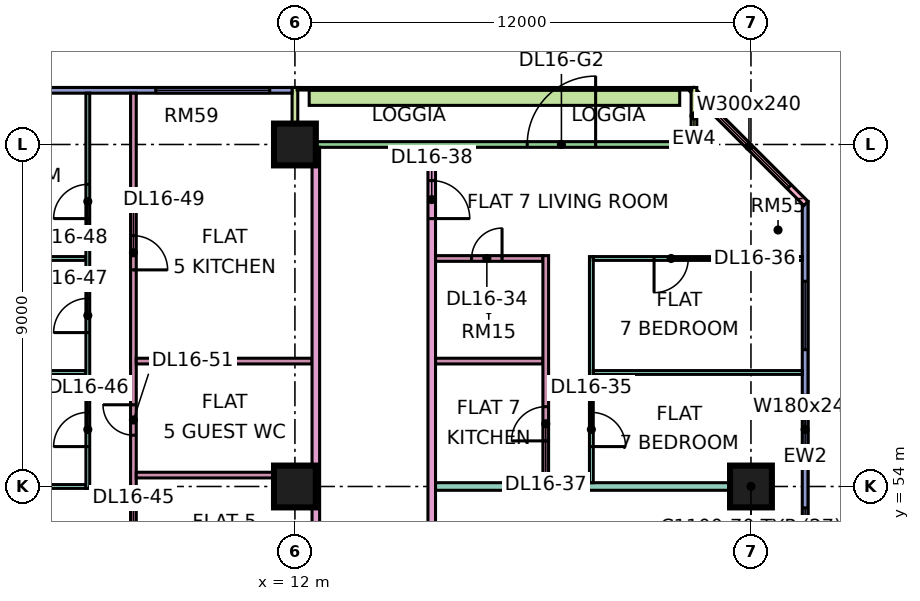
"""IFC4 building model, lengths in metres.
Left out: names, types, materials, properties, quantities, classifications, styles, units other than length and angle.
Written with IfcOpenShell. Run it as: python <this file> out.ifc"""

import sys

from ifc_helpers import new_model, si_unit, direction, frame, frame_2d, origin, origin_2d, place, context, subcontext, project, spatial, rectangle, extrude, element, fill, save


model = new_model("IFC4")
c1 = context("Model", 3, precision=1e-05, world=origin(), true_north=direction((0.0, 1.0)))
c2 = subcontext(c1, "Body", "Model", "MODEL_VIEW")
j1 = project(units=[si_unit("LENGTHUNIT", "METRE"), si_unit("PLANEANGLEUNIT", "RADIAN")], contexts=[c1])
p1 = place(None, origin())
s1 = spatial("IfcSite", under=j1, at=p1, CompositionType="ELEMENT")
p2 = place(p1, origin())
s2 = spatial("IfcBuilding", under=s1, at=p2, CompositionType="ELEMENT")
p3 = place(p2, frame((0.0, 0.0, 75.15)))
s3 = spatial("IfcBuildingStorey", under=s2, at=p3, CompositionType="ELEMENT", Elevation=75.15)
for number, where, z_axis, x_axis in (
    (1, (12.0, 54.0, 0.0), (0.0, 0.0, 1.0), (1.0, 0.0, 0.0)),
    (2, (12.0, 63.0, 0.0), (0.0, 0.0, 1.0), (1.0, 0.0, 0.0)),
    (3, (24.0, 54.0, 0.0), (0.0, 0.0, 1.0), (1.0, 0.0, 0.0)),
):
    element("IfcColumn", number, at=place(p3, frame(where, z_axis=z_axis, x_axis=x_axis)), inside=s3, PredefinedType="COLUMN", context=c2, shape_type="SweptSolid", body=[
        extrude(rectangle(XDim=1.1, YDim=1.1, at=origin_2d()), origin(), (0.0, 0.0, 1.0), 3.75),
    ])
p4 = place(p3, frame((25.425, 48.075, 0.0), z_axis=(0.0, 0.0, 1.0), x_axis=(0.0, 1.0, 0.0)))
e4 = element("IfcWall", 4, at=p4, inside=s3, PredefinedType="SOLIDWALL", context=c2, shape_type="SweptSolid", body=[
    extrude(rectangle(XDim=13.425, YDim=0.15, at=frame_2d((6.712, 0.0))), origin(), (0.0, 0.0, 1.0), 3.35),
])
p5 = place(p4, frame((0.562, 0.0, 0.45)))
e5 = element("IfcOpeningElement", 5, at=p5, cuts=e4, PredefinedType="OPENING", context=c2, shape_type="SweptSolid", body=[
    extrude(rectangle(XDim=4.8, YDim=2.4, at=frame_2d((2.4, 1.2))), frame((0.0, 0.085, 0.0), z_axis=(0.0, -1.0, 0.0), x_axis=(1.0, 0.0, 0.0)), (0.0, 0.0, 1.0), 0.17),
])
p6 = place(p4, frame((6.525, 0.0, 0.45)))
e6 = element("IfcOpeningElement", 6, at=p6, cuts=e4, PredefinedType="OPENING", context=c2, shape_type="SweptSolid", body=[
    extrude(rectangle(XDim=1.8, YDim=2.4, at=frame_2d((0.9, 1.2))), frame((0.0, 0.085, 0.0), z_axis=(0.0, -1.0, 0.0), x_axis=(1.0, 0.0, 0.0)), (0.0, 0.0, 1.0), 0.17),
])
p7 = place(p4, frame((9.525, 0.0, 0.45)))
e7 = element("IfcOpeningElement", 7, at=p7, cuts=e4, PredefinedType="OPENING", context=c2, shape_type="SweptSolid", body=[
    extrude(rectangle(XDim=1.8, YDim=2.4, at=frame_2d((0.9, 1.2))), frame((0.0, 0.085, 0.0), z_axis=(0.0, -1.0, 0.0), x_axis=(1.0, 0.0, 0.0)), (0.0, 0.0, 1.0), 0.17),
])
p8 = place(p3, frame((25.447, 61.447, 0.0), z_axis=(0.0, 0.0, 1.0), x_axis=(-0.707106781187, 0.707106781187, 0.0)))
e8 = element("IfcWall", 8, at=p8, inside=s3, PredefinedType="SOLIDWALL", context=c2, shape_type="SweptSolid", body=[
    extrude(rectangle(XDim=4.243, YDim=0.15, at=frame_2d((2.121, 0.0))), origin(), (0.0, 0.0, 1.0), 3.35),
])
p9 = place(p8, frame((0.621, 0.0, 0.45)))
e9 = element("IfcOpeningElement", 9, at=p9, cuts=e8, PredefinedType="OPENING", context=c2, shape_type="SweptSolid", body=[
    extrude(rectangle(XDim=3.0, YDim=2.4, at=frame_2d((1.5, 1.2))), frame((0.0, 0.085, 0.0), z_axis=(0.0, -1.0, 0.0), x_axis=(1.0, 0.0, 0.0)), (0.0, 0.0, 1.0), 0.17),
])
p10 = place(p3, frame((22.425, 63.0, 0.0), z_axis=(0.0, 0.0, 1.0), x_axis=(-1.0, 0.0, 0.0)))
e10 = element("IfcWall", 10, at=p10, inside=s3, PredefinedType="SOLIDWALL", context=c2, shape_type="SweptSolid", body=[
    extrude(rectangle(XDim=10.35, YDim=0.15, at=frame_2d((5.175, 0.0))), origin(), (0.0, 0.0, 1.0), 3.35),
])
p11 = place(p10, frame((2.512, 0.0, 0.0)))
e11 = element("IfcOpeningElement", 11, at=p11, cuts=e10, PredefinedType="OPENING", context=c2, shape_type="SweptSolid", body=[
    extrude(rectangle(XDim=1.8, YDim=2.4, at=frame_2d((0.9, 1.2))), frame((0.0, 0.085, 0.0), z_axis=(0.0, -1.0, 0.0), x_axis=(1.0, 0.0, 0.0)), (0.0, 0.0, 1.0), 0.17),
])
for number, where, z_axis, x_axis in (
    (12, (22.5, 64.5, 0.0), (0.0, 0.0, 1.0), (0.0, -1.0, 0.0)),
    (13, (12.0, 64.5, 0.0), (0.0, 0.0, 1.0), (0.0, -1.0, 0.0)),
):
    element("IfcWall", number, at=place(p3, frame(where, z_axis=z_axis, x_axis=x_axis)), inside=s3, PredefinedType="SOLIDWALL", context=c2, shape_type="SweptSolid", body=[
        extrude(rectangle(XDim=1.5, YDim=0.15, at=frame_2d((0.75, 0.0))), origin(), (0.0, 0.0, 1.0), 3.35),
    ])
p12 = place(p3, frame((11.925, 64.425, 0.0), z_axis=(0.0, 0.0, 1.0), x_axis=(-1.0, 0.0, 0.0)))
e14 = element("IfcWall", 14, at=p12, inside=s3, PredefinedType="SOLIDWALL", context=c2, shape_type="SweptSolid", body=[
    extrude(rectangle(XDim=10.425, YDim=0.15, at=frame_2d((5.212, 0.0))), origin(), (0.0, 0.0, 1.0), 3.35),
])
p13 = place(p12, frame((0.587, 0.0, 0.45)))
e15 = element("IfcOpeningElement", 15, at=p13, cuts=e14, PredefinedType="OPENING", context=c2, shape_type="SweptSolid", body=[
    extrude(rectangle(XDim=3.0, YDim=2.4, at=frame_2d((1.5, 1.2))), frame((0.0, 0.085, 0.0), z_axis=(0.0, -1.0, 0.0), x_axis=(1.0, 0.0, 0.0)), (0.0, 0.0, 1.0), 0.17),
])
p14 = place(p12, frame((6.4, 0.0, 0.45)))
e16 = element("IfcOpeningElement", 16, at=p14, cuts=e14, PredefinedType="OPENING", context=c2, shape_type="SweptSolid", body=[
    extrude(rectangle(XDim=3.0, YDim=2.4, at=frame_2d((1.5, 1.2))), frame((0.0, 0.085, 0.0), z_axis=(0.0, -1.0, 0.0), x_axis=(1.0, 0.0, 0.0)), (0.0, 0.0, 1.0), 0.17),
])
p15 = place(p3, frame((22.125, 64.229, 0.0), z_axis=(0.0, 0.0, 1.0), x_axis=(-1.0, 0.0, 0.0)))
e17 = element("IfcWall", 17, at=p15, inside=s3, PredefinedType="SOLIDWALL", context=c2, shape_type="SweptSolid", body=[
    extrude(rectangle(XDim=9.75, YDim=0.4, at=frame_2d((4.875, 0.0))), origin(), (0.0, 0.0, 1.0), 0.7),
])
for number, where, z_axis, x_axis in (
    (18, (-1.351, 57.0, 0.0), (0.0, 0.0, 1.0), (1.0, 0.0, 0.0)),
    (19, (-1.351, 60.0, 0.0), (0.0, 0.0, 1.0), (1.0, 0.0, 0.0)),
):
    element("IfcWall", number, at=place(p3, frame(where, z_axis=z_axis, x_axis=x_axis)), inside=s3, PredefinedType="PARTITIONING", context=c2, shape_type="SweptSolid", body=[
        extrude(rectangle(XDim=7.851, YDim=0.1, at=frame_2d((3.926, 0.0))), origin(), (0.0, 0.0, 1.0), 3.35),
    ])
p16 = place(p3, frame((0.0, 54.0, 0.0), z_axis=(0.0, 0.0, 1.0), x_axis=(1.0, 0.0, 0.0)))
e20 = element("IfcWall", 20, at=p16, inside=s3, PredefinedType="PARTITIONING", context=c2, shape_type="SweptSolid", body=[
    extrude(rectangle(XDim=6.5, YDim=0.1, at=frame_2d((3.25, 0.0))), origin(), (0.0, 0.0, 1.0), 3.35),
])
p17 = place(p3, frame((6.55, 53.95, 0.0), z_axis=(0.0, 0.0, 1.0), x_axis=(0.0, 1.0, 0.0)))
e21 = element("IfcWall", 21, at=p17, inside=s3, PredefinedType="PARTITIONING", context=c2, shape_type="SweptSolid", body=[
    extrude(rectangle(XDim=10.4, YDim=0.1, at=frame_2d((5.2, 0.0))), origin(), (0.0, 0.0, 1.0), 3.35),
])
p18 = place(p17, frame((1.1, 0.0, 0.0)))
e22 = element("IfcOpeningElement", 22, at=p18, cuts=e21, PredefinedType="OPENING", context=c2, shape_type="SweptSolid", body=[
    extrude(rectangle(XDim=0.9, YDim=2.1, at=frame_2d((0.45, 1.05))), frame((0.0, 0.06, 0.0), z_axis=(0.0, -1.0, 0.0), x_axis=(1.0, 0.0, 0.0)), (0.0, 0.0, 1.0), 0.12),
])
p19 = place(p17, frame((4.1, 0.0, 0.0)))
e23 = element("IfcOpeningElement", 23, at=p19, cuts=e21, PredefinedType="OPENING", context=c2, shape_type="SweptSolid", body=[
    extrude(rectangle(XDim=0.9, YDim=2.1, at=frame_2d((0.45, 1.05))), frame((0.0, 0.06, 0.0), z_axis=(0.0, -1.0, 0.0), x_axis=(1.0, 0.0, 0.0)), (0.0, 0.0, 1.0), 0.12),
])
p20 = place(p17, frame((7.1, 0.0, 0.0)))
e24 = element("IfcOpeningElement", 24, at=p20, cuts=e21, PredefinedType="OPENING", context=c2, shape_type="SweptSolid", body=[
    extrude(rectangle(XDim=0.9, YDim=2.1, at=frame_2d((0.45, 1.05))), frame((0.0, 0.06, 0.0), z_axis=(0.0, -1.0, 0.0), x_axis=(1.0, 0.0, 0.0)), (0.0, 0.0, 1.0), 0.12),
])
p21 = place(p3, frame((7.75, 50.925, 0.0), z_axis=(0.0, 0.0, 1.0), x_axis=(0.0, 1.0, 0.0)))
e25 = element("IfcWall", 25, at=p21, inside=s3, PredefinedType="PARTITIONING", context=c2, shape_type="SweptSolid", body=[
    extrude(rectangle(XDim=13.425, YDim=0.15, at=frame_2d((6.712, 0.0))), origin(), (0.0, 0.0, 1.0), 3.35),
])
p22 = place(p21, frame((1.275, 0.0, 0.0)))
e26 = element("IfcOpeningElement", 26, at=p22, cuts=e25, PredefinedType="OPENING", context=c2, shape_type="SweptSolid", body=[
    extrude(rectangle(XDim=0.8, YDim=2.1, at=frame_2d((0.4, 1.05))), frame((0.0, 0.085, 0.0), z_axis=(0.0, -1.0, 0.0), x_axis=(1.0, 0.0, 0.0)), (0.0, 0.0, 1.0), 0.17),
])
p23 = place(p21, frame((8.775, 0.0, 0.0)))
e27 = element("IfcOpeningElement", 27, at=p23, cuts=e25, PredefinedType="OPENING", context=c2, shape_type="SweptSolid", body=[
    extrude(rectangle(XDim=0.9, YDim=2.1, at=frame_2d((0.45, 1.05))), frame((0.0, 0.085, 0.0), z_axis=(0.0, -1.0, 0.0), x_axis=(1.0, 0.0, 0.0)), (0.0, 0.0, 1.0), 0.17),
])
p24 = place(p21, frame((4.425, 0.0, 0.0)))
e28 = element("IfcOpeningElement", 28, at=p24, cuts=e25, PredefinedType="OPENING", context=c2, shape_type="SweptSolid", body=[
    extrude(rectangle(XDim=0.8, YDim=2.1, at=frame_2d((0.4, 1.05))), frame((0.0, 0.085, 0.0), z_axis=(0.0, -1.0, 0.0), x_axis=(1.0, 0.0, 0.0)), (0.0, 0.0, 1.0), 0.17),
])
for number, where, z_axis, x_axis in (
    (29, (7.825, 54.3, 0.0), (0.0, 0.0, 1.0), (1.0, 0.0, 0.0)),
    (30, (7.825, 57.3, 0.0), (0.0, 0.0, 1.0), (1.0, 0.0, 0.0)),
):
    element("IfcWall", number, at=place(p3, frame(where, z_axis=z_axis, x_axis=x_axis)), inside=s3, PredefinedType="PARTITIONING", context=c2, shape_type="SweptSolid", body=[
        extrude(rectangle(XDim=4.625, YDim=0.15, at=frame_2d((2.312, 0.0))), origin(), (0.0, 0.0, 1.0), 3.35),
    ])
p25 = place(p3, frame((12.55, 20.0, 0.0), z_axis=(0.0, 0.0, 1.0), x_axis=(0.0, 1.0, 0.0)))
e31 = element("IfcWall", 31, at=p25, inside=s3, PredefinedType="PARTITIONING", context=c2, shape_type="SweptSolid", body=[
    extrude(rectangle(XDim=42.926, YDim=0.2, at=frame_2d((21.463, 0.0))), origin(), (0.0, 0.0, 1.0), 3.35),
])
p26 = place(p25, frame((17.1, 0.0, 0.0)))
e32 = element("IfcOpeningElement", 32, at=p26, cuts=e31, PredefinedType="OPENING", context=c2, shape_type="SweptSolid", body=[
    extrude(rectangle(XDim=1.0, YDim=2.1, at=frame_2d((0.5, 1.05))), frame((0.0, 0.11, 0.0), z_axis=(0.0, -1.0, 0.0), x_axis=(1.0, 0.0, 0.0)), (0.0, 0.0, 1.0), 0.22),
])
p27 = place(p25, frame((28.95, 0.0, 0.0)))
e33 = element("IfcOpeningElement", 33, at=p27, cuts=e31, PredefinedType="OPENING", context=c2, shape_type="SweptSolid", body=[
    extrude(rectangle(XDim=1.0, YDim=2.1, at=frame_2d((0.5, 1.05))), frame((0.0, 0.11, 0.0), z_axis=(0.0, -1.0, 0.0), x_axis=(1.0, 0.0, 0.0)), (0.0, 0.0, 1.0), 0.22),
])
p28 = place(p25, frame((0.6, 0.0, 0.0)))
e34 = element("IfcOpeningElement", 34, at=p28, cuts=e31, PredefinedType="OPENING", context=c2, shape_type="SweptSolid", body=[
    extrude(rectangle(XDim=1.2, YDim=2.1, at=frame_2d((0.6, 1.05))), frame((0.0, 0.11, 0.0), z_axis=(0.0, -1.0, 0.0), x_axis=(1.0, 0.0, 0.0)), (0.0, 0.0, 1.0), 0.22),
])
p29 = place(p25, frame((11.1, 0.0, 0.0)))
e35 = element("IfcOpeningElement", 35, at=p29, cuts=e31, PredefinedType="OPENING", context=c2, shape_type="SweptSolid", body=[
    extrude(rectangle(XDim=1.0, YDim=2.1, at=frame_2d((0.5, 1.05))), frame((0.0, 0.11, 0.0), z_axis=(0.0, -1.0, 0.0), x_axis=(1.0, 0.0, 0.0)), (0.0, 0.0, 1.0), 0.22),
])
p30 = place(p3, frame((15.6, 51.225, 0.0), z_axis=(0.0, 0.0, 1.0), x_axis=(0.0, 1.0, 0.0)))
e36 = element("IfcWall", 36, at=p30, inside=s3, PredefinedType="PARTITIONING", context=c2, shape_type="SweptSolid", body=[
    extrude(rectangle(XDim=11.701, YDim=0.2, at=frame_2d((5.851, 0.0))), origin(), (0.0, 0.0, 1.0), 3.35),
])
p31 = place(p30, frame((9.825, 0.0, 0.0)))
e37 = element("IfcOpeningElement", 37, at=p31, cuts=e36, PredefinedType="OPENING", context=c2, shape_type="SweptSolid", body=[
    extrude(rectangle(XDim=1.0, YDim=2.1, at=frame_2d((0.5, 1.05))), frame((0.0, 0.11, 0.0), z_axis=(0.0, -1.0, 0.0), x_axis=(1.0, 0.0, 0.0)), (0.0, 0.0, 1.0), 0.22),
])
p32 = place(p3, frame((15.7, 54.0, 0.0), z_axis=(0.0, 0.0, 1.0), x_axis=(1.0, 0.0, 0.0)))
e38 = element("IfcWall", 38, at=p32, inside=s3, PredefinedType="PARTITIONING", context=c2, shape_type="SweptSolid", body=[
    extrude(rectangle(XDim=8.3, YDim=0.2, at=frame_2d((4.15, 0.0))), origin(), (0.0, 0.0, 1.0), 3.35),
])
p33 = place(p3, frame((15.7, 57.3, 0.0), z_axis=(0.0, 0.0, 1.0), x_axis=(1.0, 0.0, 0.0)))
e39 = element("IfcWall", 39, at=p33, inside=s3, PredefinedType="PARTITIONING", context=c2, shape_type="SweptSolid", body=[
    extrude(rectangle(XDim=2.825, YDim=0.15, at=frame_2d((1.413, 0.0))), origin(), (0.0, 0.0, 1.0), 3.35),
])
p34 = place(p3, frame((15.7, 60.0, 0.0), z_axis=(0.0, 0.0, 1.0), x_axis=(1.0, 0.0, 0.0)))
e40 = element("IfcWall", 40, at=p34, inside=s3, PredefinedType="PARTITIONING", context=c2, shape_type="SweptSolid", body=[
    extrude(rectangle(XDim=2.825, YDim=0.15, at=frame_2d((1.413, 0.0))), origin(), (0.0, 0.0, 1.0), 3.35),
])
p35 = place(p34, frame((0.95, 0.0, 0.0)))
e41 = element("IfcOpeningElement", 41, at=p35, cuts=e40, PredefinedType="OPENING", context=c2, shape_type="SweptSolid", body=[
    extrude(rectangle(XDim=0.8, YDim=2.1, at=frame_2d((0.4, 1.05))), frame((0.0, 0.085, 0.0), z_axis=(0.0, -1.0, 0.0), x_axis=(1.0, 0.0, 0.0)), (0.0, 0.0, 1.0), 0.17),
])
p36 = place(p3, frame((18.6, 54.1, 0.0), z_axis=(0.0, 0.0, 1.0), x_axis=(0.0, 1.0, 0.0)))
e42 = element("IfcWall", 42, at=p36, inside=s3, PredefinedType="PARTITIONING", context=c2, shape_type="SweptSolid", body=[
    extrude(rectangle(XDim=5.975, YDim=0.15, at=frame_2d((2.987, 0.0))), origin(), (0.0, 0.0, 1.0), 3.35),
])
p37 = place(p36, frame((1.1, 0.0, 0.0)))
e43 = element("IfcOpeningElement", 43, at=p37, cuts=e42, PredefinedType="OPENING", context=c2, shape_type="SweptSolid", body=[
    extrude(rectangle(XDim=0.9, YDim=2.1, at=frame_2d((0.45, 1.05))), frame((0.0, 0.085, 0.0), z_axis=(0.0, -1.0, 0.0), x_axis=(1.0, 0.0, 0.0)), (0.0, 0.0, 1.0), 0.17),
])
p38 = place(p3, frame((19.8, 54.1, 0.0), z_axis=(0.0, 0.0, 1.0), x_axis=(0.0, 1.0, 0.0)))
e44 = element("IfcWall", 44, at=p38, inside=s3, PredefinedType="PARTITIONING", context=c2, shape_type="SweptSolid", body=[
    extrude(rectangle(XDim=5.95, YDim=0.1, at=frame_2d((2.975, 0.0))), origin(), (0.0, 0.0, 1.0), 3.35),
])
p39 = place(p38, frame((0.95, 0.0, 0.0)))
e45 = element("IfcOpeningElement", 45, at=p39, cuts=e44, PredefinedType="OPENING", context=c2, shape_type="SweptSolid", body=[
    extrude(rectangle(XDim=0.9, YDim=2.1, at=frame_2d((0.45, 1.05))), frame((0.0, 0.06, 0.0), z_axis=(0.0, -1.0, 0.0), x_axis=(1.0, 0.0, 0.0)), (0.0, 0.0, 1.0), 0.12),
])
p40 = place(p3, frame((19.85, 57.0, 0.0), z_axis=(0.0, 0.0, 1.0), x_axis=(1.0, 0.0, 0.0)))
e46 = element("IfcWall", 46, at=p40, inside=s3, PredefinedType="PARTITIONING", context=c2, shape_type="SweptSolid", body=[
    extrude(rectangle(XDim=5.501, YDim=0.1, at=frame_2d((2.75, 0.0))), origin(), (0.0, 0.0, 1.0), 3.35),
])
p41 = place(p3, frame((19.85, 60.0, 0.0), z_axis=(0.0, 0.0, 1.0), x_axis=(1.0, 0.0, 0.0)))
e47 = element("IfcWall", 47, at=p41, inside=s3, PredefinedType="PARTITIONING", context=c2, shape_type="SweptSolid", body=[
    extrude(rectangle(XDim=5.5, YDim=0.1, at=frame_2d((2.75, 0.0))), origin(), (0.0, 0.0, 1.0), 3.35),
])
p42 = place(p41, frame((1.6, 0.0, 0.0)))
e48 = element("IfcOpeningElement", 48, at=p42, cuts=e47, PredefinedType="OPENING", context=c2, shape_type="SweptSolid", body=[
    extrude(rectangle(XDim=0.9, YDim=2.1, at=frame_2d((0.45, 1.05))), frame((0.0, 0.06, 0.0), z_axis=(0.0, -1.0, 0.0), x_axis=(1.0, 0.0, 0.0)), (0.0, 0.0, 1.0), 0.12),
])
p43 = place(p5, origin())
e49 = element("IfcWindow", 49, at=p43, inside=s3, PartitioningType="SINGLE_PANEL", PredefinedType="WINDOW", context=c2, shape_type="SweptSolid", body=[
    extrude(rectangle(XDim=4.8, YDim=2.4, at=frame_2d((2.4, 1.2))), frame((0.0, 0.03, 0.0), z_axis=(0.0, -1.0, 0.0), x_axis=(1.0, 0.0, 0.0)), (0.0, 0.0, 1.0), 0.06),
])
fill(e5, e49)
p44 = place(p6, origin())
e50 = element("IfcWindow", 50, at=p44, inside=s3, PartitioningType="SINGLE_PANEL", PredefinedType="WINDOW", context=c2, shape_type="SweptSolid", body=[
    extrude(rectangle(XDim=1.8, YDim=2.4, at=frame_2d((0.9, 1.2))), frame((0.0, 0.03, 0.0), z_axis=(0.0, -1.0, 0.0), x_axis=(1.0, 0.0, 0.0)), (0.0, 0.0, 1.0), 0.06),
])
fill(e6, e50)
p45 = place(p7, origin())
e51 = element("IfcWindow", 51, at=p45, inside=s3, PartitioningType="SINGLE_PANEL", PredefinedType="WINDOW", context=c2, shape_type="SweptSolid", body=[
    extrude(rectangle(XDim=1.8, YDim=2.4, at=frame_2d((0.9, 1.2))), frame((0.0, 0.03, 0.0), z_axis=(0.0, -1.0, 0.0), x_axis=(1.0, 0.0, 0.0)), (0.0, 0.0, 1.0), 0.06),
])
fill(e7, e51)
p46 = place(p9, origin())
e52 = element("IfcWindow", 52, at=p46, inside=s3, PartitioningType="SINGLE_PANEL", PredefinedType="WINDOW", context=c2, shape_type="SweptSolid", body=[
    extrude(rectangle(XDim=3.0, YDim=2.4, at=frame_2d((1.5, 1.2))), frame((0.0, 0.03, 0.0), z_axis=(0.0, -1.0, 0.0), x_axis=(1.0, 0.0, 0.0)), (0.0, 0.0, 1.0), 0.06),
])
fill(e9, e52)
p47 = place(p11, frame((1.8, 0.0, 0.0), z_axis=(0.0, 0.0, 1.0), x_axis=(-1.0, 0.0, 0.0)))
e53 = element("IfcDoor", 53, at=p47, inside=s3, OperationType="DOUBLE_DOOR_SINGLE_SWING", PredefinedType="DOOR", context=c2, shape_type="SweptSolid", body=[
    extrude(rectangle(XDim=1.8, YDim=2.4, at=frame_2d((0.9, 1.2))), frame((0.0, 0.025, 0.0), z_axis=(0.0, -1.0, 0.0), x_axis=(1.0, 0.0, 0.0)), (0.0, 0.0, 1.0), 0.05),
])
fill(e11, e53)
p48 = place(p13, origin())
e54 = element("IfcWindow", 54, at=p48, inside=s3, PartitioningType="SINGLE_PANEL", PredefinedType="WINDOW", context=c2, shape_type="SweptSolid", body=[
    extrude(rectangle(XDim=3.0, YDim=2.4, at=frame_2d((1.5, 1.2))), frame((0.0, 0.03, 0.0), z_axis=(0.0, -1.0, 0.0), x_axis=(1.0, 0.0, 0.0)), (0.0, 0.0, 1.0), 0.06),
])
fill(e15, e54)
p49 = place(p35, frame((0.8, 0.0, 0.0), z_axis=(0.0, 0.0, 1.0), x_axis=(-1.0, 0.0, 0.0)))
e55 = element("IfcDoor", 55, at=p49, inside=s3, OperationType="SINGLE_SWING_RIGHT", PredefinedType="DOOR", context=c2, shape_type="SweptSolid", body=[
    extrude(rectangle(XDim=0.8, YDim=2.1, at=frame_2d((0.4, 1.05))), frame((0.0, 0.025, 0.0), z_axis=(0.0, -1.0, 0.0), x_axis=(1.0, 0.0, 0.0)), (0.0, 0.0, 1.0), 0.05),
])
fill(e41, e55)
p50 = place(p39, frame((0.9, 0.0, 0.0), z_axis=(0.0, 0.0, 1.0), x_axis=(-1.0, 0.0, 0.0)))
e56 = element("IfcDoor", 56, at=p50, inside=s3, OperationType="SINGLE_SWING_LEFT", PredefinedType="DOOR", context=c2, shape_type="SweptSolid", body=[
    extrude(rectangle(XDim=0.9, YDim=2.1, at=frame_2d((0.45, 1.05))), frame((0.0, 0.025, 0.0), z_axis=(0.0, -1.0, 0.0), x_axis=(1.0, 0.0, 0.0)), (0.0, 0.0, 1.0), 0.05),
])
fill(e45, e56)
p51 = place(p42, frame((0.9, 0.0, 0.0), z_axis=(0.0, 0.0, 1.0), x_axis=(-1.0, 0.0, 0.0)))
e57 = element("IfcDoor", 57, at=p51, inside=s3, OperationType="SINGLE_SWING_LEFT", PredefinedType="DOOR", context=c2, shape_type="SweptSolid", body=[
    extrude(rectangle(XDim=0.9, YDim=2.1, at=frame_2d((0.45, 1.05))), frame((0.0, 0.025, 0.0), z_axis=(0.0, -1.0, 0.0), x_axis=(1.0, 0.0, 0.0)), (0.0, 0.0, 1.0), 0.05),
])
fill(e48, e57)
p52 = place(p37, origin())
e58 = element("IfcDoor", 58, at=p52, inside=s3, OperationType="SINGLE_SWING_LEFT", PredefinedType="DOOR", context=c2, shape_type="SweptSolid", body=[
    extrude(rectangle(XDim=0.9, YDim=2.1, at=frame_2d((0.45, 1.05))), frame((0.0, 0.025, 0.0), z_axis=(0.0, -1.0, 0.0), x_axis=(1.0, 0.0, 0.0)), (0.0, 0.0, 1.0), 0.05),
])
fill(e43, e58)
p53 = place(p31, frame((1.0, 0.0, 0.0), z_axis=(0.0, 0.0, 1.0), x_axis=(-1.0, 0.0, 0.0)))
e59 = element("IfcDoor", 59, at=p53, inside=s3, OperationType="SINGLE_SWING_LEFT", PredefinedType="DOOR", context=c2, shape_type="SweptSolid", body=[
    extrude(rectangle(XDim=1.0, YDim=2.1, at=frame_2d((0.5, 1.05))), frame((0.0, 0.025, 0.0), z_axis=(0.0, -1.0, 0.0), x_axis=(1.0, 0.0, 0.0)), (0.0, 0.0, 1.0), 0.05),
])
fill(e37, e59)
p54 = place(p18, origin())
e60 = element("IfcDoor", 60, at=p54, inside=s3, OperationType="SINGLE_SWING_LEFT", PredefinedType="DOOR", context=c2, shape_type="SweptSolid", body=[
    extrude(rectangle(XDim=0.9, YDim=2.1, at=frame_2d((0.45, 1.05))), frame((0.0, 0.025, 0.0), z_axis=(0.0, -1.0, 0.0), x_axis=(1.0, 0.0, 0.0)), (0.0, 0.0, 1.0), 0.05),
])
fill(e22, e60)
p55 = place(p19, origin())
e61 = element("IfcDoor", 61, at=p55, inside=s3, OperationType="SINGLE_SWING_LEFT", PredefinedType="DOOR", context=c2, shape_type="SweptSolid", body=[
    extrude(rectangle(XDim=0.9, YDim=2.1, at=frame_2d((0.45, 1.05))), frame((0.0, 0.025, 0.0), z_axis=(0.0, -1.0, 0.0), x_axis=(1.0, 0.0, 0.0)), (0.0, 0.0, 1.0), 0.05),
])
fill(e23, e61)
p56 = place(p20, origin())
e62 = element("IfcDoor", 62, at=p56, inside=s3, OperationType="SINGLE_SWING_LEFT", PredefinedType="DOOR", context=c2, shape_type="SweptSolid", body=[
    extrude(rectangle(XDim=0.9, YDim=2.1, at=frame_2d((0.45, 1.05))), frame((0.0, 0.025, 0.0), z_axis=(0.0, -1.0, 0.0), x_axis=(1.0, 0.0, 0.0)), (0.0, 0.0, 1.0), 0.05),
])
fill(e24, e62)
p57 = place(p23, frame((0.9, 0.0, 0.0), z_axis=(0.0, 0.0, 1.0), x_axis=(-1.0, 0.0, 0.0)))
e63 = element("IfcDoor", 63, at=p57, inside=s3, OperationType="SINGLE_SWING_LEFT", PredefinedType="DOOR", context=c2, shape_type="SweptSolid", body=[
    extrude(rectangle(XDim=0.9, YDim=2.1, at=frame_2d((0.45, 1.05))), frame((0.0, 0.025, 0.0), z_axis=(0.0, -1.0, 0.0), x_axis=(1.0, 0.0, 0.0)), (0.0, 0.0, 1.0), 0.05),
])
fill(e27, e63)
p58 = place(p24, frame((0.8, 0.0, 0.0), z_axis=(0.0, 0.0, 1.0), x_axis=(-1.0, 0.0, 0.0)))
e64 = element("IfcDoor", 64, at=p58, inside=s3, OperationType="SINGLE_SWING_RIGHT", PredefinedType="DOOR", context=c2, shape_type="SweptSolid", body=[
    extrude(rectangle(XDim=0.8, YDim=2.1, at=frame_2d((0.4, 1.05))), frame((0.0, 0.025, 0.0), z_axis=(0.0, -1.0, 0.0), x_axis=(1.0, 0.0, 0.0)), (0.0, 0.0, 1.0), 0.05),
])
fill(e28, e64)
save(model, sys.argv[1])
